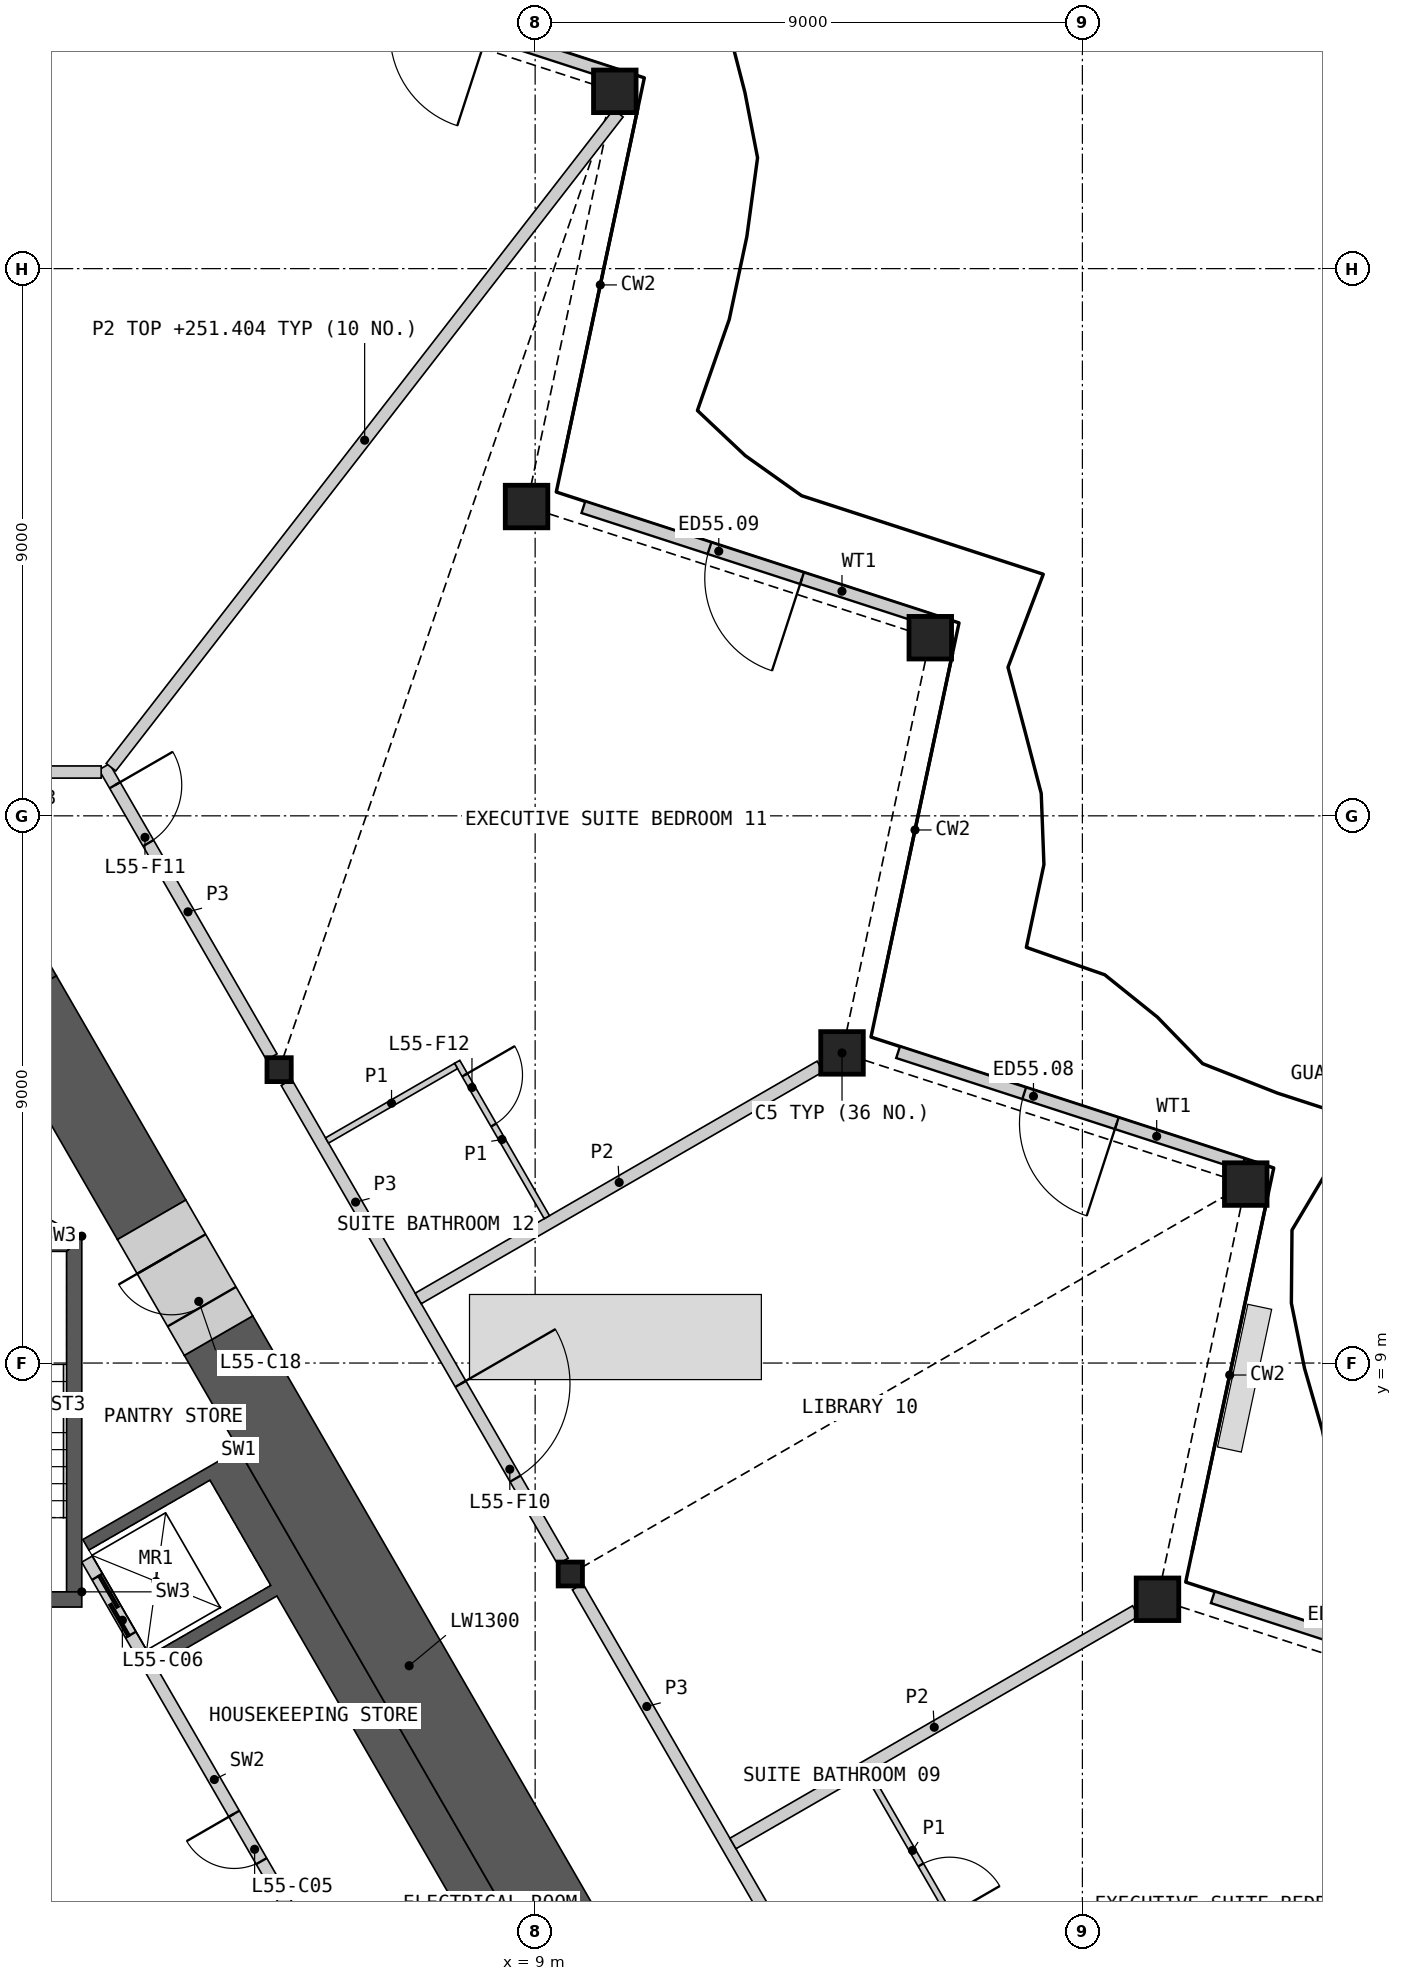
"""IFC4 building model, lengths in metres.
Left out: names, types, materials, properties, quantities, classifications, styles, units other than length and angle.
Written with IfcOpenShell. Run it as: python <this file> out.ifc"""

import sys

from ifc_helpers import new_model, si_unit, direction, frame, frame_2d, origin, origin_2d, place, context, subcontext, project, spatial, polyline, rectangle, hollow_rectangle, i_section, outline, extrude, element, fill, save


model = new_model("IFC4")
c1 = context("Model", 3, precision=1e-05, world=origin(), true_north=direction((0.0, 1.0)))
c2 = subcontext(c1, "Body", "Model", "MODEL_VIEW")
j1 = project(units=[si_unit("LENGTHUNIT", "METRE"), si_unit("PLANEANGLEUNIT", "RADIAN")], contexts=[c1])
p1 = place(None, origin())
s1 = spatial("IfcSite", under=j1, at=p1, CompositionType="ELEMENT")
p2 = place(p1, origin())
s2 = spatial("IfcBuilding", under=s1, at=p2, CompositionType="ELEMENT")
p3 = place(p2, frame((0.0, 0.0, 249.0)))
s3 = spatial("IfcBuildingStorey", under=s2, at=p3, CompositionType="ELEMENT", Elevation=249.0)
for number, where, z_axis, x_axis in (
    (1, (19.235, 5.115, 0.0), (0.0, 0.0, 1.0), (1.0, 0.0, 0.0)),
    (2, (20.687, 11.943, 0.0), (0.0, 0.0, 1.0), (1.0, 0.0, 0.0)),
    (3, (14.047, 14.101, 0.0), (0.0, 0.0, 1.0), (1.0, 0.0, 0.0)),
    (4, (15.499, 20.93, 0.0), (0.0, 0.0, 1.0), (1.0, 0.0, 0.0)),
    (5, (8.859, 23.087, 0.0), (0.0, 0.0, 1.0), (1.0, 0.0, 0.0)),
    (6, (10.31, 29.916, 0.0), (0.0, 0.0, 1.0), (1.0, 0.0, 0.0)),
):
    element("IfcColumn", number, at=place(p3, frame(where, z_axis=z_axis, x_axis=x_axis)), inside=s3, PredefinedType="COLUMN", context=c2, shape_type="SweptSolid", body=[
        extrude(hollow_rectangle(XDim=0.7, YDim=0.7, WallThickness=0.045, at=origin_2d()), origin(), (0.0, 0.0, 1.0), 3.6),
    ])
for number, where, z_axis, x_axis in (
    (7, (9.578, 5.53, 0.0), (0.0, 0.0, 1.0), (1.0, 0.0, 0.0)),
    (8, (4.789, 13.825, 0.0), (0.0, 0.0, 1.0), (1.0, 0.0, 0.0)),
):
    element("IfcColumn", number, at=place(p3, frame(where, z_axis=z_axis, x_axis=x_axis)), inside=s3, PredefinedType="COLUMN", context=c2, shape_type="SweptSolid", body=[
        extrude(i_section(OverallWidth=0.399, OverallDepth=0.393, WebThickness=0.023, FlangeThickness=0.037, at=origin_2d()), origin(), (0.0, 0.0, 1.0), 3.6),
    ])
p4 = place(p3, frame((25.815, 3.304, 0.0), z_axis=(0.0, 0.0, 1.0), x_axis=(-0.951055430656, 0.309020335608, 0.0)))
e9 = element("IfcWall", 9, at=p4, inside=s3, PredefinedType="SOLIDWALL", context=c2, shape_type="SweptSolid", body=[
    extrude(rectangle(XDim=5.962, YDim=0.2, at=frame_2d((2.981, 0.0))), origin(), (0.0, 0.0, 1.0), 2.701),
])
p5 = place(p4, frame((2.181, 0.0, 0.0)))
e10 = element("IfcOpeningElement", 10, at=p5, cuts=e9, PredefinedType="OPENING", context=c2, shape_type="SweptSolid", body=[
    extrude(rectangle(XDim=1.6, YDim=2.4, at=frame_2d((0.8, 1.2))), frame((0.0, 0.11, 0.0), z_axis=(0.0, -1.0, 0.0), x_axis=(1.0, 0.0, 0.0)), (0.0, 0.0, 1.0), 0.22),
])
p6 = place(p3, frame((20.64, 12.269, 0.0), z_axis=(0.0, 0.0, 1.0), x_axis=(-0.95104730696, 0.309045336358, 0.0)))
e11 = element("IfcWall", 11, at=p6, inside=s3, PredefinedType="SOLIDWALL", context=c2, shape_type="SweptSolid", body=[
    extrude(rectangle(XDim=5.963, YDim=0.2, at=frame_2d((2.981, 0.0))), origin(), (0.0, 0.0, 1.0), 2.701),
])
p7 = place(p6, frame((2.181, 0.0, 0.0)))
e12 = element("IfcOpeningElement", 12, at=p7, cuts=e11, PredefinedType="OPENING", context=c2, shape_type="SweptSolid", body=[
    extrude(rectangle(XDim=1.6, YDim=2.4, at=frame_2d((0.8, 1.2))), frame((0.0, 0.11, 0.0), z_axis=(0.0, -1.0, 0.0), x_axis=(1.0, 0.0, 0.0)), (0.0, 0.0, 1.0), 0.22),
])
p8 = place(p3, frame((15.464, 21.233, 0.0), z_axis=(0.0, 0.0, 1.0), x_axis=(-0.951055430656, 0.309020335608, 0.0)))
e13 = element("IfcWall", 13, at=p8, inside=s3, PredefinedType="SOLIDWALL", context=c2, shape_type="SweptSolid", body=[
    extrude(rectangle(XDim=5.962, YDim=0.2, at=frame_2d((2.981, 0.0))), origin(), (0.0, 0.0, 1.0), 2.701),
])
p9 = place(p8, frame((2.181, 0.0, 0.0)))
e14 = element("IfcOpeningElement", 14, at=p9, cuts=e13, PredefinedType="OPENING", context=c2, shape_type="SweptSolid", body=[
    extrude(rectangle(XDim=1.6, YDim=2.4, at=frame_2d((0.8, 1.2))), frame((0.0, 0.11, 0.0), z_axis=(0.0, -1.0, 0.0), x_axis=(1.0, 0.0, 0.0)), (0.0, 0.0, 1.0), 0.22),
])
p10 = place(p3, frame((10.288, 30.198, 0.0), z_axis=(0.0, 0.0, 1.0), x_axis=(-0.951055430656, 0.309020335608, 0.0)))
e15 = element("IfcWall", 15, at=p10, inside=s3, PredefinedType="SOLIDWALL", context=c2, shape_type="SweptSolid", body=[
    extrude(rectangle(XDim=5.962, YDim=0.2, at=frame_2d((2.981, 0.0))), origin(), (0.0, 0.0, 1.0), 2.701),
])
p11 = place(p10, frame((2.181, 0.0, 0.0)))
e16 = element("IfcOpeningElement", 16, at=p11, cuts=e15, PredefinedType="OPENING", context=c2, shape_type="SweptSolid", body=[
    extrude(rectangle(XDim=1.6, YDim=2.4, at=frame_2d((0.8, 1.2))), frame((0.0, 0.11, 0.0), z_axis=(0.0, -1.0, 0.0), x_axis=(1.0, 0.0, 0.0)), (0.0, 0.0, 1.0), 0.22),
])
p12 = place(p3, origin())
e17 = element("IfcWall", 17, at=p12, inside=s3, PredefinedType="SHEAR", context=c2, shape_type="SweptSolid", body=[
    extrude(outline(polyline([(4.124, 7.577), (8.624, -0.217), (8.231, -0.444), (6.061, -1.697), (5.96, -1.524), (7.952, -0.374), (4.752, 5.169), (2.76, 4.019), (2.66, 4.192), (4.652, 5.342), (3.652, 7.074), (1.66, 5.924), (1.561, 6.097), (3.731, 7.35), (4.124, 7.577)])), origin(), (0.0, 0.0, 1.0), 3.25),
])
p13 = place(p3, frame((5.817, -1.476, 0.0), z_axis=(0.0, 0.0, 1.0), x_axis=(-0.500002616675, 0.866023893041, 0.0)))
e18 = element("IfcWall", 18, at=p13, inside=s3, PredefinedType="SOLIDWALL", context=c2, shape_type="SweptSolid", body=[
    extrude(rectangle(XDim=8.373, YDim=0.2, at=frame_2d((4.187, 0.0))), origin(), (0.0, 0.0, 1.0), 3.25),
])
p14 = place(p13, frame((2.637, 0.0, 0.0)))
e19 = element("IfcOpeningElement", 19, at=p14, cuts=e18, PredefinedType="OPENING", context=c2, shape_type="SweptSolid", body=[
    extrude(rectangle(XDim=0.9, YDim=2.1, at=frame_2d((0.45, 1.05))), frame((0.0, 0.11, 0.0), z_axis=(0.0, -1.0, 0.0), x_axis=(1.0, 0.0, 0.0)), (0.0, 0.0, 1.0), 0.22),
])
p15 = place(p13, frame((6.937, 0.0, 0.0)))
e20 = element("IfcOpeningElement", 20, at=p15, cuts=e18, PredefinedType="OPENING", context=c2, shape_type="SweptSolid", body=[
    extrude(rectangle(XDim=1.1, YDim=2.1, at=frame_2d((0.55, 1.05))), frame((0.0, 0.11, 0.0), z_axis=(0.0, -1.0, 0.0), x_axis=(1.0, 0.0, 0.0)), (0.0, 0.0, 1.0), 0.22),
])
p16 = place(p3, origin())
e21 = element("IfcWall", 21, at=p16, inside=s3, PredefinedType="SHEAR", context=c2, shape_type="SweptSolid", body=[
    extrude(outline(polyline([(1.544, 5.237), (1.544, 11.087), (1.294, 10.837), (1.294, 5.237), (1.544, 5.237)])), origin(), (0.0, 0.0, 1.0), 3.25),
])
p17 = place(p3, origin())
e22 = element("IfcWall", 22, at=p17, inside=s3, PredefinedType="SHEAR", context=c2, shape_type="SweptSolid", body=[
    extrude(outline(polyline([(1.544, 11.087), (-1.544, 11.087), (-1.294, 10.837), (1.294, 10.837), (1.544, 11.087)])), origin(), (0.0, 0.0, 1.0), 3.25),
])
p18 = place(p3, frame((1.544, 5.112, 0.0), z_axis=(0.0, 0.0, 1.0), x_axis=(-1.0, 0.0, 0.0)))
e23 = element("IfcWall", 23, at=p18, inside=s3, PredefinedType="SHEAR", context=c2, shape_type="SweptSolid", body=[
    extrude(rectangle(XDim=3.088, YDim=0.25, at=frame_2d((1.544, 0.0))), origin(), (0.0, 0.0, 1.0), 3.25),
])
p19 = place(p18, frame((0.994, 0.0, 0.0)))
e24 = element("IfcOpeningElement", 24, at=p19, cuts=e23, PredefinedType="OPENING", context=c2, shape_type="SweptSolid", body=[
    extrude(rectangle(XDim=1.1, YDim=2.1, at=frame_2d((0.55, 1.05))), frame((0.0, 0.135, 0.0), z_axis=(0.0, -1.0, 0.0), x_axis=(1.0, 0.0, 0.0)), (0.0, 0.0, 1.0), 0.27),
])
p20 = place(p3, frame((-1.237, 12.578, 0.0), z_axis=(0.0, 0.0, 1.0), x_axis=(0.866045649925, -0.499964931016, 0.0)))
e25 = element("IfcWall", 25, at=p20, inside=s3, PredefinedType="PARTITIONING", context=c2, shape_type="SweptSolid", body=[
    extrude(rectangle(XDim=2.992, YDim=0.15, at=frame_2d((1.496, 0.0))), origin(), (0.0, 0.0, 1.0), 3.25),
])
p21 = place(p3, frame((10.062, -1.408, 0.0), z_axis=(0.0, 0.0, 1.0), x_axis=(-0.500000545805, 0.866025088663, 0.0)))
e26 = element("IfcWall", 26, at=p21, inside=s3, PredefinedType="SHEAR", context=c2, shape_type="SweptSolid", body=[
    extrude(rectangle(XDim=12.539, YDim=1.3, at=frame_2d((6.27, 0.0))), origin(), (0.0, 0.0, 1.0), 3.25),
])
p22 = place(p3, frame((2.693, 11.356, 0.0), z_axis=(0.0, 0.0, 1.0), x_axis=(-0.50002837164, 0.866009022791, 0.0)))
e27 = element("IfcWall", 27, at=p22, inside=s3, PredefinedType="SHEAR", context=c2, shape_type="SweptSolid", body=[
    extrude(rectangle(XDim=4.26, YDim=1.3, at=frame_2d((2.13, 0.0))), origin(), (0.0, 0.0, 1.0), 3.25),
])
p23 = place(p3, origin())
e28 = element("IfcWall", 28, at=p23, inside=s3, PredefinedType="SHEAR", context=c2, shape_type="SweptSolid", body=[
    extrude(outline(polyline([(-1.126, 15.371), (0.0, 17.321), (1.126, 15.371), (0.0, 14.72), (-1.126, 15.371)])), origin(), (0.0, 0.0, 1.0), 3.25),
])
p24 = place(p3, frame((3.793, 9.451, 0.0), z_axis=(0.0, 0.0, 1.0), x_axis=(-0.499946605688, 0.86605622881, 0.0)))
e29 = element("IfcWall", 29, at=p24, inside=s3, PredefinedType="SHEAR", context=c2, shape_type="SweptSolid", body=[
    extrude(rectangle(XDim=2.2, YDim=1.3, at=frame_2d((1.1, 0.0))), origin(), (0.0, 0.0, 1.0), 3.25),
])
p25 = place(p24, frame((0.55, 0.0, 0.0)))
e30 = element("IfcOpeningElement", 30, at=p25, cuts=e29, PredefinedType="OPENING", context=c2, shape_type="SweptSolid", body=[
    extrude(rectangle(XDim=1.0, YDim=2.1, at=frame_2d((0.5, 1.05))), frame((0.0, 0.66, 0.0), z_axis=(0.0, -1.0, 0.0), x_axis=(1.0, 0.0, 0.0)), (0.0, 0.0, 1.0), 1.32),
])
p26 = place(p3, frame((9.699, 5.321, 0.0), z_axis=(0.0, 0.0, 1.0), x_axis=(0.49998193945, -0.866035830797, 0.0)))
e31 = element("IfcWall", 31, at=p26, inside=s3, PredefinedType="PARTITIONING", context=c2, shape_type="SweptSolid", body=[
    extrude(rectangle(XDim=9.094, YDim=0.2, at=frame_2d((4.547, 0.0))), origin(), (0.0, 0.0, 1.0), 3.25),
])
p27 = place(p3, frame((4.91, 13.616, 0.0), z_axis=(0.0, 0.0, 1.0), x_axis=(0.50000207303, -0.866024206917, 0.0)))
e32 = element("IfcWall", 32, at=p27, inside=s3, PredefinedType="PARTITIONING", context=c2, shape_type="SweptSolid", body=[
    extrude(rectangle(XDim=9.095, YDim=0.2, at=frame_2d((4.547, 0.0))), origin(), (0.0, 0.0, 1.0), 3.25),
])
p28 = place(p27, frame((5.726, 0.0, 0.0)))
e33 = element("IfcOpeningElement", 33, at=p28, cuts=e32, PredefinedType="OPENING", context=c2, shape_type="SweptSolid", body=[
    extrude(rectangle(XDim=1.8, YDim=2.1, at=frame_2d((0.9, 1.05))), frame((0.0, 0.11, 0.0), z_axis=(0.0, -1.0, 0.0), x_axis=(1.0, 0.0, 0.0)), (0.0, 0.0, 1.0), 0.22),
])
p29 = place(p3, frame((1.913, 18.807, 0.0), z_axis=(0.0, 0.0, 1.0), x_axis=(0.499984524817, -0.866034338201, 0.0)))
e34 = element("IfcWall", 34, at=p29, inside=s3, PredefinedType="PARTITIONING", context=c2, shape_type="SweptSolid", body=[
    extrude(rectangle(XDim=5.51, YDim=0.2, at=frame_2d((2.755, 0.0))), origin(), (0.0, 0.0, 1.0), 3.25),
])
p30 = place(p29, frame((0.35, 0.0, 0.0)))
e35 = element("IfcOpeningElement", 35, at=p30, cuts=e34, PredefinedType="OPENING", context=c2, shape_type="SweptSolid", body=[
    extrude(rectangle(XDim=1.1, YDim=2.1, at=frame_2d((0.55, 1.05))), frame((0.0, 0.11, 0.0), z_axis=(0.0, -1.0, 0.0), x_axis=(1.0, 0.0, 0.0)), (0.0, 0.0, 1.0), 0.22),
])
p31 = place(p3, frame((-1.863, 18.72, 0.0), z_axis=(0.0, 0.0, 1.0), x_axis=(1.0, 0.0, 0.0)))
e36 = element("IfcWall", 36, at=p31, inside=s3, PredefinedType="PARTITIONING", context=c2, shape_type="SweptSolid", body=[
    extrude(rectangle(XDim=3.726, YDim=0.2, at=frame_2d((1.863, 0.0))), origin(), (0.0, 0.0, 1.0), 3.25),
])
p32 = place(p31, frame((0.963, 0.0, 0.0)))
e37 = element("IfcOpeningElement", 37, at=p32, cuts=e36, PredefinedType="OPENING", context=c2, shape_type="SweptSolid", body=[
    extrude(rectangle(XDim=1.8, YDim=2.1, at=frame_2d((0.9, 1.05))), frame((0.0, 0.11, 0.0), z_axis=(0.0, -1.0, 0.0), x_axis=(1.0, 0.0, 0.0)), (0.0, 0.0, 1.0), 0.22),
])
p33 = place(p3, frame((2.024, 18.8, 0.0), z_axis=(0.0, 0.0, 1.0), x_axis=(0.612908308889, 0.790154038713, 0.0)))
e38 = element("IfcWall", 38, at=p33, inside=s3, PredefinedType="PARTITIONING", context=c2, shape_type="SweptSolid", body=[
    extrude(rectangle(XDim=13.613, YDim=0.2, at=frame_2d((6.807, 0.0))), origin(), (0.0, 0.0, 1.0), 2.404),
])
p34 = place(p3, frame((12.253, 1.098, 0.0), z_axis=(0.0, 0.0, 1.0), x_axis=(0.866026077102, 0.499998833779, 0.0)))
e39 = element("IfcWall", 39, at=p34, inside=s3, PredefinedType="PARTITIONING", context=c2, shape_type="SweptSolid", body=[
    extrude(rectangle(XDim=7.646, YDim=0.2, at=frame_2d((3.823, 0.0))), origin(), (0.0, 0.0, 1.0), 2.404),
])
p35 = place(p3, frame((7.077, 10.062, 0.0), z_axis=(0.0, 0.0, 1.0), x_axis=(0.866041764179, 0.499971661894, 0.0)))
e40 = element("IfcWall", 40, at=p35, inside=s3, PredefinedType="PARTITIONING", context=c2, shape_type="SweptSolid", body=[
    extrude(rectangle(XDim=7.632, YDim=0.2, at=frame_2d((3.816, 0.0))), origin(), (0.0, 0.0, 1.0), 2.404),
])
p36 = place(p3, frame((14.468, 2.261, 0.0), z_axis=(0.0, 0.0, 1.0), x_axis=(0.500037662692, -0.866003658127, 0.0)))
e41 = element("IfcWall", 41, at=p36, inside=s3, PredefinedType="PARTITIONING", context=c2, shape_type="SweptSolid", body=[
    extrude(rectangle(XDim=2.95, YDim=0.1, at=frame_2d((1.475, 0.0))), origin(), (0.0, 0.0, 1.0), 2.404),
])
p37 = place(p36, frame((1.75, 0.0, 0.0)))
e42 = element("IfcOpeningElement", 42, at=p37, cuts=e41, PredefinedType="OPENING", context=c2, shape_type="SweptSolid", body=[
    extrude(rectangle(XDim=0.95, YDim=2.1, at=frame_2d((0.475, 1.05))), frame((0.0, 0.06, 0.0), z_axis=(0.0, -1.0, 0.0), x_axis=(1.0, 0.0, 0.0)), (0.0, 0.0, 1.0), 0.12),
])
p38 = place(p3, frame((7.717, 13.954, 0.0), z_axis=(0.0, 0.0, 1.0), x_axis=(0.500001826776, -0.866024349092, 0.0)))
e43 = element("IfcWall", 43, at=p38, inside=s3, PredefinedType="PARTITIONING", context=c2, shape_type="SweptSolid", body=[
    extrude(rectangle(XDim=2.95, YDim=0.1, at=frame_2d((1.475, 0.0))), origin(), (0.0, 0.0, 1.0), 2.404),
])
p39 = place(p38, frame((0.25, 0.0, 0.0)))
e44 = element("IfcOpeningElement", 44, at=p39, cuts=e43, PredefinedType="OPENING", context=c2, shape_type="SweptSolid", body=[
    extrude(rectangle(XDim=0.95, YDim=2.1, at=frame_2d((0.475, 1.05))), frame((0.0, 0.06, 0.0), z_axis=(0.0, -1.0, 0.0), x_axis=(1.0, 0.0, 0.0)), (0.0, 0.0, 1.0), 0.12),
])
p40 = place(p3, frame((5.577, 12.66, 0.0), z_axis=(0.0, 0.0, 1.0), x_axis=(0.866014668023, 0.500018594424, 0.0)))
e45 = element("IfcWall", 45, at=p40, inside=s3, PredefinedType="PARTITIONING", context=c2, shape_type="SweptSolid", body=[
    extrude(rectangle(XDim=2.45, YDim=0.1, at=frame_2d((1.225, 0.0))), origin(), (0.0, 0.0, 1.0), 2.404),
])
p41 = place(p7, origin())
e46 = element("IfcDoor", 46, at=p41, inside=s3, OperationType="DOUBLE_DOOR_SINGLE_SWING", PredefinedType="DOOR", context=c2, shape_type="SweptSolid", body=[
    extrude(rectangle(XDim=1.6, YDim=2.4, at=frame_2d((0.8, 1.2))), frame((0.0, 0.025, 0.0), z_axis=(0.0, -1.0, 0.0), x_axis=(1.0, 0.0, 0.0)), (0.0, 0.0, 1.0), 0.05),
])
fill(e12, e46)
p42 = place(p9, origin())
e47 = element("IfcDoor", 47, at=p42, inside=s3, OperationType="DOUBLE_DOOR_SINGLE_SWING", PredefinedType="DOOR", context=c2, shape_type="SweptSolid", body=[
    extrude(rectangle(XDim=1.6, YDim=2.4, at=frame_2d((0.8, 1.2))), frame((0.0, 0.025, 0.0), z_axis=(0.0, -1.0, 0.0), x_axis=(1.0, 0.0, 0.0)), (0.0, 0.0, 1.0), 0.05),
])
fill(e14, e47)
p43 = place(p14, origin())
e48 = element("IfcDoor", 48, at=p43, inside=s3, OperationType="SINGLE_SWING_RIGHT", PredefinedType="DOOR", context=c2, shape_type="SweptSolid", body=[
    extrude(rectangle(XDim=0.9, YDim=2.1, at=frame_2d((0.45, 1.05))), frame((0.0, 0.025, 0.0), z_axis=(0.0, -1.0, 0.0), x_axis=(1.0, 0.0, 0.0)), (0.0, 0.0, 1.0), 0.05),
])
fill(e19, e48)
p44 = place(p15, origin())
e49 = element("IfcDoor", 49, at=p44, inside=s3, OperationType="SLIDING_TO_LEFT", PredefinedType="DOOR", context=c2, shape_type="SweptSolid", body=[
    extrude(rectangle(XDim=1.1, YDim=2.1, at=frame_2d((0.55, 1.05))), frame((0.0, 0.025, 0.0), z_axis=(0.0, -1.0, 0.0), x_axis=(1.0, 0.0, 0.0)), (0.0, 0.0, 1.0), 0.05),
])
fill(e20, e49)
p45 = place(p25, origin())
e50 = element("IfcDoor", 50, at=p45, inside=s3, OperationType="SINGLE_SWING_RIGHT", PredefinedType="DOOR", context=c2, shape_type="SweptSolid", body=[
    extrude(rectangle(XDim=1.0, YDim=2.1, at=frame_2d((0.5, 1.05))), frame((0.0, 0.405, 0.0), z_axis=(0.0, -1.0, 0.0), x_axis=(1.0, 0.0, 0.0)), (0.0, 0.0, 1.0), 0.05),
])
fill(e30, e50)
p46 = place(p37, origin())
e51 = element("IfcDoor", 51, at=p46, inside=s3, OperationType="SINGLE_SWING_RIGHT", PredefinedType="DOOR", context=c2, shape_type="SweptSolid", body=[
    extrude(rectangle(XDim=0.95, YDim=2.1, at=frame_2d((0.475, 1.05))), frame((0.0, 0.025, 0.0), z_axis=(0.0, -1.0, 0.0), x_axis=(1.0, 0.0, 0.0)), (0.0, 0.0, 1.0), 0.05),
])
fill(e42, e51)
p47 = place(p28, origin())
e52 = element("IfcDoor", 52, at=p47, inside=s3, OperationType="DOUBLE_DOOR_SINGLE_SWING", PredefinedType="DOOR", context=c2, shape_type="SweptSolid", body=[
    extrude(rectangle(XDim=1.8, YDim=2.1, at=frame_2d((0.9, 1.05))), frame((0.0, 0.025, 0.0), z_axis=(0.0, -1.0, 0.0), x_axis=(1.0, 0.0, 0.0)), (0.0, 0.0, 1.0), 0.05),
])
fill(e33, e52)
p48 = place(p30, origin())
e53 = element("IfcDoor", 53, at=p48, inside=s3, OperationType="SINGLE_SWING_LEFT", PredefinedType="DOOR", context=c2, shape_type="SweptSolid", body=[
    extrude(rectangle(XDim=1.1, YDim=2.1, at=frame_2d((0.55, 1.05))), frame((0.0, 0.025, 0.0), z_axis=(0.0, -1.0, 0.0), x_axis=(1.0, 0.0, 0.0)), (0.0, 0.0, 1.0), 0.05),
])
fill(e35, e53)
p49 = place(p39, origin())
e54 = element("IfcDoor", 54, at=p49, inside=s3, OperationType="SINGLE_SWING_LEFT", PredefinedType="DOOR", context=c2, shape_type="SweptSolid", body=[
    extrude(rectangle(XDim=0.95, YDim=2.1, at=frame_2d((0.475, 1.05))), frame((0.0, 0.025, 0.0), z_axis=(0.0, -1.0, 0.0), x_axis=(1.0, 0.0, 0.0)), (0.0, 0.0, 1.0), 0.05),
])
fill(e44, e54)
save(model, sys.argv[1])
